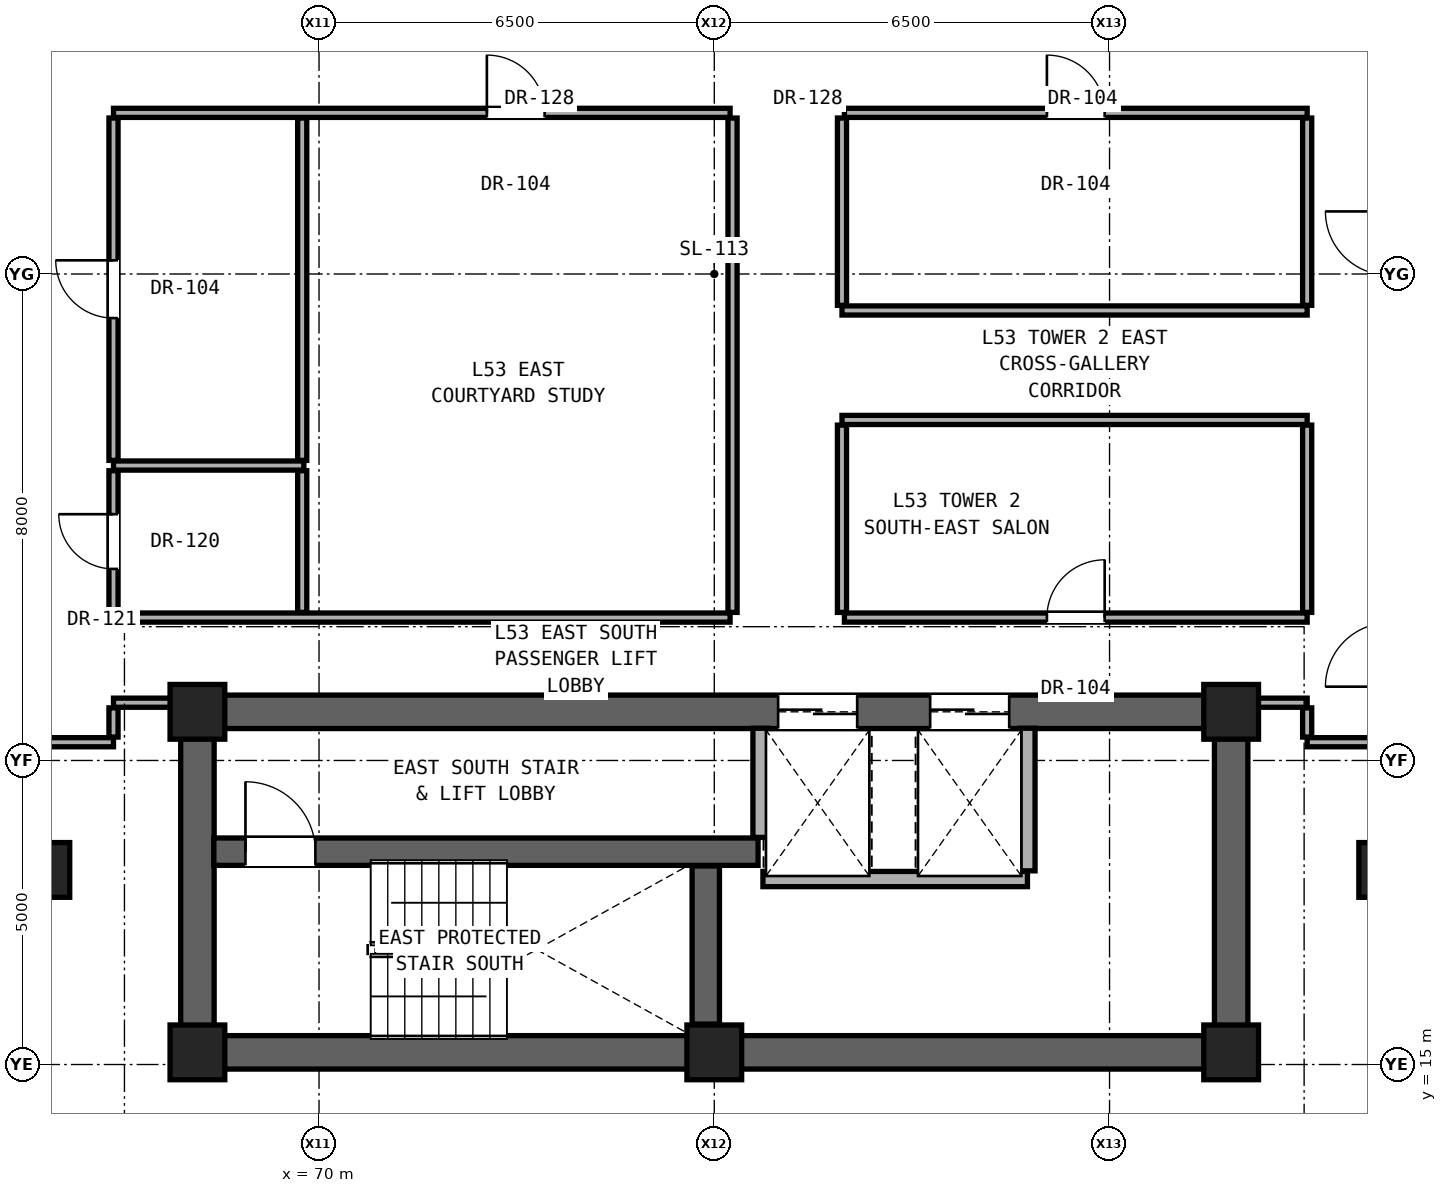
"""IFC4 building model, lengths in metres.
Left out: names, types, materials, properties, quantities, classifications, styles, units other than length and angle.
Written with IfcOpenShell. Run it as: python <this file> out.ifc"""

import sys

from ifc_helpers import new_model, si_unit, direction, frame, frame_2d, origin, origin_2d, place, context, subcontext, project, spatial, rectangle, extrude, element, fill, save


model = new_model("IFC4")
c1 = context("Model", 3, precision=1e-05, world=origin(), true_north=direction((0.0, 1.0)))
c2 = subcontext(c1, "Body", "Model", "MODEL_VIEW")
j1 = project(units=[si_unit("LENGTHUNIT", "METRE"), si_unit("PLANEANGLEUNIT", "RADIAN")], contexts=[c1])
p1 = place(None, origin())
s1 = spatial("IfcSite", under=j1, at=p1, CompositionType="ELEMENT")
p2 = place(p1, origin())
s2 = spatial("IfcBuilding", under=s1, at=p2, CompositionType="ELEMENT")
p3 = place(p2, frame((0.0, 0.0, 186.9)))
s3 = spatial("IfcBuildingStorey", under=s2, at=p3, CompositionType="ELEMENT", Elevation=186.9)
for number, where, z_axis, x_axis in (
    (1, (68.0, 15.2, 0.0), (0.0, 0.0, 1.0), (1.0, 0.0, 0.0)),
    (2, (76.5, 15.2, 0.0), (0.0, 0.0, 1.0), (1.0, 0.0, 0.0)),
    (3, (85.0, 15.2, 0.0), (0.0, 0.0, 1.0), (1.0, 0.0, 0.0)),
    (4, (68.0, 20.8, 0.0), (0.0, 0.0, 1.0), (1.0, 0.0, 0.0)),
    (5, (85.0, 20.8, 0.0), (0.0, 0.0, 1.0), (1.0, 0.0, 0.0)),
):
    element("IfcColumn", number, at=place(p3, frame(where, z_axis=z_axis, x_axis=x_axis)), inside=s3, PredefinedType="COLUMN", context=c2, shape_type="SweptSolid", body=[
        extrude(rectangle(XDim=0.9, YDim=0.9, at=origin_2d()), origin(), (0.0, 0.0, 1.0), 3.25),
    ])
for number, where, z_axis, x_axis in (
    (6, (65.6, 18.2, 0.0), (0.0, 0.0, 1.0), (1.0, 0.0, 0.0)),
    (7, (87.4, 18.2, 0.0), (0.0, 0.0, 1.0), (1.0, 0.0, 0.0)),
):
    element("IfcColumn", number, at=place(p3, frame(where, z_axis=z_axis, x_axis=x_axis)), inside=s3, PredefinedType="PILASTER", context=c2, shape_type="SweptSolid", body=[
        extrude(rectangle(XDim=0.6, YDim=0.9, at=origin_2d()), origin(), (0.0, 0.0, 1.0), 3.25),
    ])
p4 = place(p3, frame((68.0, 15.2, 0.0), z_axis=(0.0, 0.0, 1.0), x_axis=(1.0, 0.0, 0.0)))
e8 = element("IfcWall", 8, at=p4, inside=s3, PredefinedType="SHEAR", context=c2, shape_type="SweptSolid", body=[
    extrude(rectangle(XDim=17.0, YDim=0.55, at=frame_2d((8.5, 0.0))), origin(), (0.0, 0.0, 1.0), 3.05),
])
for number, where, z_axis, x_axis in (
    (9, (68.0, 15.2, 0.0), (0.0, 0.0, 1.0), (0.0, 1.0, 0.0)),
    (10, (85.0, 15.2, 0.0), (0.0, 0.0, 1.0), (0.0, 1.0, 0.0)),
):
    element("IfcWall", number, at=place(p3, frame(where, z_axis=z_axis, x_axis=x_axis)), inside=s3, PredefinedType="SHEAR", context=c2, shape_type="SweptSolid", body=[
        extrude(rectangle(XDim=5.6, YDim=0.55, at=frame_2d((2.8, 0.0))), origin(), (0.0, 0.0, 1.0), 3.05),
    ])
p5 = place(p3, frame((68.0, 20.8, 0.0), z_axis=(0.0, 0.0, 1.0), x_axis=(1.0, 0.0, 0.0)))
e11 = element("IfcWall", 11, at=p5, inside=s3, PredefinedType="SHEAR", context=c2, shape_type="SweptSolid", body=[
    extrude(rectangle(XDim=17.0, YDim=0.55, at=frame_2d((8.5, 0.0))), origin(), (0.0, 0.0, 1.0), 3.05),
])
p6 = place(p5, frame((9.55, 0.0, 0.0)))
e12 = element("IfcOpeningElement", 12, at=p6, cuts=e11, PredefinedType="OPENING", context=c2, shape_type="SweptSolid", body=[
    extrude(rectangle(XDim=1.3, YDim=2.3, at=frame_2d((0.65, 1.15))), frame((0.0, 0.285, 0.0), z_axis=(0.0, -1.0, 0.0), x_axis=(1.0, 0.0, 0.0)), (0.0, 0.0, 1.0), 0.57),
])
p7 = place(p5, frame((12.05, 0.0, 0.0)))
e13 = element("IfcOpeningElement", 13, at=p7, cuts=e11, PredefinedType="OPENING", context=c2, shape_type="SweptSolid", body=[
    extrude(rectangle(XDim=1.3, YDim=2.3, at=frame_2d((0.65, 1.15))), frame((0.0, 0.285, 0.0), z_axis=(0.0, -1.0, 0.0), x_axis=(1.0, 0.0, 0.0)), (0.0, 0.0, 1.0), 0.57),
])
p8 = place(p3, frame((77.3, 18.05, 0.0), z_axis=(0.0, 0.0, 1.0), x_axis=(1.0, 0.0, 0.0)))
e14 = element("IfcWall", 14, at=p8, inside=s3, PredefinedType="SOLIDWALL", context=c2, shape_type="SweptSolid", body=[
    extrude(rectangle(XDim=4.35, YDim=0.25, at=frame_2d((2.175, 0.0))), origin(), (0.0, 0.0, 1.0), 3.05),
])
p9 = place(p3, frame((68.27, 18.5, 0.0), z_axis=(0.0, 0.0, 1.0), x_axis=(1.0, 0.0, 0.0)))
e15 = element("IfcWall", 15, at=p9, inside=s3, PredefinedType="SHEAR", context=c2, shape_type="SweptSolid", body=[
    extrude(rectangle(XDim=8.95, YDim=0.45, at=frame_2d((4.475, 0.0))), origin(), (0.0, 0.0, 1.0), 3.05),
])
p10 = place(p9, frame((0.52, 0.0, 0.0)))
e16 = element("IfcOpeningElement", 16, at=p10, cuts=e15, PredefinedType="OPENING", context=c2, shape_type="SweptSolid", body=[
    extrude(rectangle(XDim=1.15, YDim=2.2, at=frame_2d((0.575, 1.1))), frame((0.0, 0.235, 0.0), z_axis=(0.0, -1.0, 0.0), x_axis=(1.0, 0.0, 0.0)), (0.0, 0.0, 1.0), 0.47),
])
p11 = place(p3, frame((65.25, 20.3, 0.0), z_axis=(0.0, 0.0, 1.0), x_axis=(1.0, 0.0, 0.0)))
e17 = element("IfcWall", 17, at=p11, inside=s3, PredefinedType="PARTITIONING", context=c2, shape_type="SweptSolid", body=[
    extrude(rectangle(XDim=1.37, YDim=0.15, at=frame_2d((0.685, 0.0))), origin(), (0.0, 0.0, 1.0), 3.05),
])
p12 = place(p3, frame((86.25, 20.3, 0.0), z_axis=(0.0, 0.0, 1.0), x_axis=(1.0, 0.0, 0.0)))
e18 = element("IfcWall", 18, at=p12, inside=s3, PredefinedType="PARTITIONING", context=c2, shape_type="SweptSolid", body=[
    extrude(rectangle(XDim=1.35, YDim=0.15, at=frame_2d((0.675, 0.0))), origin(), (0.0, 0.0, 1.0), 3.05),
])
p13 = place(p3, frame((66.62, 20.95, 0.0), z_axis=(0.0, 0.0, 1.0), x_axis=(1.0, 0.0, 0.0)))
e19 = element("IfcWall", 19, at=p13, inside=s3, PredefinedType="PARTITIONING", context=c2, shape_type="SweptSolid", body=[
    extrude(rectangle(XDim=1.11, YDim=0.15, at=frame_2d((0.555, 0.0))), origin(), (0.0, 0.0, 1.0), 2.442),
])
p14 = place(p3, frame((85.27, 20.95, 0.0), z_axis=(0.0, 0.0, 1.0), x_axis=(1.0, 0.0, 0.0)))
e20 = element("IfcWall", 20, at=p14, inside=s3, PredefinedType="PARTITIONING", context=c2, shape_type="SweptSolid", body=[
    extrude(rectangle(XDim=0.98, YDim=0.15, at=frame_2d((0.49, 0.0))), origin(), (0.0, 0.0, 1.0), 2.442),
])
p15 = place(p3, frame((66.62, 22.35, 0.0), z_axis=(0.0, 0.0, 1.0), x_axis=(1.0, 0.0, 0.0)))
e21 = element("IfcWall", 21, at=p15, inside=s3, PredefinedType="PARTITIONING", context=c2, shape_type="SweptSolid", body=[
    extrude(rectangle(XDim=10.14, YDim=0.15, at=frame_2d((5.07, 0.0))), origin(), (0.0, 0.0, 1.0), 2.186),
])
p16 = place(p3, frame((78.64, 22.35, 0.0), z_axis=(0.0, 0.0, 1.0), x_axis=(1.0, 0.0, 0.0)))
e22 = element("IfcWall", 22, at=p16, inside=s3, PredefinedType="PARTITIONING", context=c2, shape_type="SweptSolid", body=[
    extrude(rectangle(XDim=7.61, YDim=0.15, at=frame_2d((3.805, 0.0))), origin(), (0.0, 0.0, 1.0), 2.186),
])
p17 = place(p16, frame((3.33, 0.0, 0.0)))
e23 = element("IfcOpeningElement", 23, at=p17, cuts=e22, PredefinedType="OPENING", context=c2, shape_type="SweptSolid", body=[
    extrude(rectangle(XDim=0.95, YDim=2.15, at=frame_2d((0.475, 1.075))), frame((0.0, 0.085, 0.0), z_axis=(0.0, -1.0, 0.0), x_axis=(1.0, 0.0, 0.0)), (0.0, 0.0, 1.0), 0.17),
])
p18 = place(p3, frame((66.62, 24.85, 0.0), z_axis=(0.0, 0.0, 1.0), x_axis=(1.0, 0.0, 0.0)))
e24 = element("IfcWall", 24, at=p18, inside=s3, PredefinedType="PARTITIONING", context=c2, shape_type="SweptSolid", body=[
    extrude(rectangle(XDim=3.13, YDim=0.15, at=frame_2d((1.565, 0.0))), origin(), (0.0, 0.0, 1.0), 2.186),
])
for number, where, z_axis, x_axis in (
    (25, (78.6, 25.6, 0.0), (0.0, 0.0, 1.0), (1.0, 0.0, 0.0)),
    (26, (78.6, 27.4, 0.0), (0.0, 0.0, 1.0), (1.0, 0.0, 0.0)),
):
    element("IfcWall", number, at=place(p3, frame(where, z_axis=z_axis, x_axis=x_axis)), inside=s3, PredefinedType="PARTITIONING", context=c2, shape_type="SweptSolid", body=[
        extrude(rectangle(XDim=7.65, YDim=0.15, at=frame_2d((3.825, 0.0))), origin(), (0.0, 0.0, 1.0), 2.186),
    ])
p19 = place(p3, frame((66.62, 30.65, 0.0), z_axis=(0.0, 0.0, 1.0), x_axis=(1.0, 0.0, 0.0)))
e27 = element("IfcWall", 27, at=p19, inside=s3, PredefinedType="PARTITIONING", context=c2, shape_type="SweptSolid", body=[
    extrude(rectangle(XDim=10.14, YDim=0.15, at=frame_2d((5.07, 0.0))), origin(), (0.0, 0.0, 1.0), 2.186),
])
p20 = place(p19, frame((6.14, 0.0, 0.0)))
e28 = element("IfcOpeningElement", 28, at=p20, cuts=e27, PredefinedType="OPENING", context=c2, shape_type="SweptSolid", body=[
    extrude(rectangle(XDim=0.95, YDim=2.15, at=frame_2d((0.475, 1.075))), frame((0.0, 0.085, 0.0), z_axis=(0.0, -1.0, 0.0), x_axis=(1.0, 0.0, 0.0)), (0.0, 0.0, 1.0), 0.17),
])
p21 = place(p3, frame((78.64, 30.65, 0.0), z_axis=(0.0, 0.0, 1.0), x_axis=(1.0, 0.0, 0.0)))
e29 = element("IfcWall", 29, at=p21, inside=s3, PredefinedType="PARTITIONING", context=c2, shape_type="SweptSolid", body=[
    extrude(rectangle(XDim=7.61, YDim=0.15, at=frame_2d((3.805, 0.0))), origin(), (0.0, 0.0, 1.0), 2.186),
])
p22 = place(p21, frame((3.33, 0.0, 0.0)))
e30 = element("IfcOpeningElement", 30, at=p22, cuts=e29, PredefinedType="OPENING", context=c2, shape_type="SweptSolid", body=[
    extrude(rectangle(XDim=0.95, YDim=2.15, at=frame_2d((0.475, 1.075))), frame((0.0, 0.085, 0.0), z_axis=(0.0, -1.0, 0.0), x_axis=(1.0, 0.0, 0.0)), (0.0, 0.0, 1.0), 0.17),
])
p23 = place(p3, frame((66.62, 20.385, 0.0), z_axis=(0.0, 0.0, 1.0), x_axis=(0.0, 1.0, 0.0)))
e31 = element("IfcWall", 31, at=p23, inside=s3, PredefinedType="PARTITIONING", context=c2, shape_type="SweptSolid", body=[
    extrude(rectangle(XDim=0.48, YDim=0.15, at=frame_2d((0.24, 0.0))), origin(), (0.0, 0.0, 1.0), 2.442),
])
p24 = place(p3, frame((66.62, 22.435, 0.0), z_axis=(0.0, 0.0, 1.0), x_axis=(0.0, 1.0, 0.0)))
e32 = element("IfcWall", 32, at=p24, inside=s3, PredefinedType="PARTITIONING", context=c2, shape_type="SweptSolid", body=[
    extrude(rectangle(XDim=2.33, YDim=0.15, at=frame_2d((1.165, 0.0))), origin(), (0.0, 0.0, 1.0), 3.05),
])
p25 = place(p24, frame((0.715, 0.0, 0.0)))
e33 = element("IfcOpeningElement", 33, at=p25, cuts=e32, PredefinedType="OPENING", context=c2, shape_type="SweptSolid", body=[
    extrude(rectangle(XDim=0.9, YDim=2.1, at=frame_2d((0.45, 1.05))), frame((0.0, 0.085, 0.0), z_axis=(0.0, -1.0, 0.0), x_axis=(1.0, 0.0, 0.0)), (0.0, 0.0, 1.0), 0.17),
])
p26 = place(p3, frame((66.62, 24.935, 0.0), z_axis=(0.0, 0.0, 1.0), x_axis=(0.0, 1.0, 0.0)))
e34 = element("IfcWall", 34, at=p26, inside=s3, PredefinedType="PARTITIONING", context=c2, shape_type="SweptSolid", body=[
    extrude(rectangle(XDim=5.63, YDim=0.15, at=frame_2d((2.815, 0.0))), origin(), (0.0, 0.0, 1.0), 2.346),
])
p27 = place(p26, frame((2.34, 0.0, 0.0)))
e35 = element("IfcOpeningElement", 35, at=p27, cuts=e34, PredefinedType="OPENING", context=c2, shape_type="SweptSolid", body=[
    extrude(rectangle(XDim=0.95, YDim=2.15, at=frame_2d((0.475, 1.075))), frame((0.0, 0.085, 0.0), z_axis=(0.0, -1.0, 0.0), x_axis=(1.0, 0.0, 0.0)), (0.0, 0.0, 1.0), 0.17),
])
p28 = place(p3, frame((69.723, 22.435, 0.0), z_axis=(0.0, 0.0, 1.0), x_axis=(0.0, 1.0, 0.0)))
e36 = element("IfcWall", 36, at=p28, inside=s3, PredefinedType="PARTITIONING", context=c2, shape_type="SweptSolid", body=[
    extrude(rectangle(XDim=2.33, YDim=0.15, at=frame_2d((1.165, 0.0))), origin(), (0.0, 0.0, 1.0), 3.05),
])
p29 = place(p3, frame((69.723, 24.935, 0.0), z_axis=(0.0, 0.0, 1.0), x_axis=(0.0, 1.0, 0.0)))
e37 = element("IfcWall", 37, at=p29, inside=s3, PredefinedType="PARTITIONING", context=c2, shape_type="SweptSolid", body=[
    extrude(rectangle(XDim=5.63, YDim=0.15, at=frame_2d((2.815, 0.0))), origin(), (0.0, 0.0, 1.0), 2.186),
])
p30 = place(p3, frame((76.36, 15.665, 0.0), z_axis=(0.0, 0.0, 1.0), x_axis=(0.0, 1.0, 0.0)))
e38 = element("IfcWall", 38, at=p30, inside=s3, PredefinedType="SHEAR", context=c2, shape_type="SweptSolid", body=[
    extrude(rectangle(XDim=2.6, YDim=0.45, at=frame_2d((1.3, 0.0))), origin(), (0.0, 0.0, 1.0), 3.05),
])
p31 = place(p3, frame((76.8, 22.435, 0.0), z_axis=(0.0, 0.0, 1.0), x_axis=(0.0, 1.0, 0.0)))
e39 = element("IfcWall", 39, at=p31, inside=s3, PredefinedType="PARTITIONING", context=c2, shape_type="SweptSolid", body=[
    extrude(rectangle(XDim=8.13, YDim=0.15, at=frame_2d((4.065, 0.0))), origin(), (0.0, 0.0, 1.0), 2.186),
])
p32 = place(p3, frame((77.26, 18.735, 0.0), z_axis=(0.0, 0.0, 1.0), x_axis=(0.0, 1.0, 0.0)))
e40 = element("IfcWall", 40, at=p32, inside=s3, PredefinedType="SOLIDWALL", context=c2, shape_type="SweptSolid", body=[
    extrude(rectangle(XDim=1.795, YDim=0.25, at=frame_2d((0.897, 0.0))), origin(), (0.0, 0.0, 1.0), 3.05),
])
p33 = place(p3, frame((78.6, 22.435, 0.0), z_axis=(0.0, 0.0, 1.0), x_axis=(0.0, 1.0, 0.0)))
e41 = element("IfcWall", 41, at=p33, inside=s3, PredefinedType="PARTITIONING", context=c2, shape_type="SweptSolid", body=[
    extrude(rectangle(XDim=3.08, YDim=0.15, at=frame_2d((1.54, 0.0))), origin(), (0.0, 0.0, 1.0), 3.05),
])
p34 = place(p3, frame((78.6, 27.485, 0.0), z_axis=(0.0, 0.0, 1.0), x_axis=(0.0, 1.0, 0.0)))
e42 = element("IfcWall", 42, at=p34, inside=s3, PredefinedType="PARTITIONING", context=c2, shape_type="SweptSolid", body=[
    extrude(rectangle(XDim=3.08, YDim=0.15, at=frame_2d((1.54, 0.0))), origin(), (0.0, 0.0, 1.0), 2.186),
])
p35 = place(p3, frame((81.65, 18.185, 0.0), z_axis=(0.0, 0.0, 1.0), x_axis=(0.0, 1.0, 0.0)))
e43 = element("IfcWall", 43, at=p35, inside=s3, PredefinedType="SOLIDWALL", context=c2, shape_type="SweptSolid", body=[
    extrude(rectangle(XDim=2.345, YDim=0.25, at=frame_2d((1.172, 0.0))), origin(), (0.0, 0.0, 1.0), 3.05),
])
p36 = place(p3, frame((86.25, 20.385, 0.0), z_axis=(0.0, 0.0, 1.0), x_axis=(0.0, 1.0, 0.0)))
e44 = element("IfcWall", 44, at=p36, inside=s3, PredefinedType="PARTITIONING", context=c2, shape_type="SweptSolid", body=[
    extrude(rectangle(XDim=0.48, YDim=0.15, at=frame_2d((0.24, 0.0))), origin(), (0.0, 0.0, 1.0), 2.442),
])
p37 = place(p3, frame((86.25, 22.435, 0.0), z_axis=(0.0, 0.0, 1.0), x_axis=(0.0, 1.0, 0.0)))
e45 = element("IfcWall", 45, at=p37, inside=s3, PredefinedType="PARTITIONING", context=c2, shape_type="SweptSolid", body=[
    extrude(rectangle(XDim=3.08, YDim=0.15, at=frame_2d((1.54, 0.0))), origin(), (0.0, 0.0, 1.0), 3.05),
])
p38 = place(p3, frame((86.25, 27.485, 0.0), z_axis=(0.0, 0.0, 1.0), x_axis=(0.0, 1.0, 0.0)))
e46 = element("IfcWall", 46, at=p38, inside=s3, PredefinedType="PARTITIONING", context=c2, shape_type="SweptSolid", body=[
    extrude(rectangle(XDim=3.08, YDim=0.15, at=frame_2d((1.54, 0.0))), origin(), (0.0, 0.0, 1.0), 2.346),
])
p39 = place(p10, origin())
e47 = element("IfcDoor", 47, at=p39, inside=s3, OperationType="SINGLE_SWING_LEFT", PredefinedType="DOOR", context=c2, shape_type="SweptSolid", body=[
    extrude(rectangle(XDim=1.15, YDim=2.2, at=frame_2d((0.575, 1.1))), frame((0.0, 0.025, 0.0), z_axis=(0.0, -1.0, 0.0), x_axis=(1.0, 0.0, 0.0)), (0.0, 0.0, 1.0), 0.05),
])
fill(e16, e47)
p40 = place(p25, origin())
e48 = element("IfcDoor", 48, at=p40, inside=s3, OperationType="SINGLE_SWING_RIGHT", PredefinedType="DOOR", context=c2, shape_type="SweptSolid", body=[
    extrude(rectangle(XDim=0.9, YDim=2.1, at=frame_2d((0.45, 1.05))), frame((0.0, 0.025, 0.0), z_axis=(0.0, -1.0, 0.0), x_axis=(1.0, 0.0, 0.0)), (0.0, 0.0, 1.0), 0.05),
])
fill(e33, e48)
p41 = place(p27, origin())
e49 = element("IfcDoor", 49, at=p41, inside=s3, OperationType="SINGLE_SWING_RIGHT", PredefinedType="DOOR", context=c2, shape_type="SweptSolid", body=[
    extrude(rectangle(XDim=0.95, YDim=2.15, at=frame_2d((0.475, 1.075))), frame((0.0, 0.025, 0.0), z_axis=(0.0, -1.0, 0.0), x_axis=(1.0, 0.0, 0.0)), (0.0, 0.0, 1.0), 0.05),
])
fill(e35, e49)
p42 = place(p20, origin())
e50 = element("IfcDoor", 50, at=p42, inside=s3, OperationType="SINGLE_SWING_LEFT", PredefinedType="DOOR", context=c2, shape_type="SweptSolid", body=[
    extrude(rectangle(XDim=0.95, YDim=2.15, at=frame_2d((0.475, 1.075))), frame((0.0, 0.025, 0.0), z_axis=(0.0, -1.0, 0.0), x_axis=(1.0, 0.0, 0.0)), (0.0, 0.0, 1.0), 0.05),
])
fill(e28, e50)
p43 = place(p17, origin())
e51 = element("IfcDoor", 51, at=p43, inside=s3, OperationType="SINGLE_SWING_RIGHT", PredefinedType="DOOR", context=c2, shape_type="SweptSolid", body=[
    extrude(rectangle(XDim=0.95, YDim=2.15, at=frame_2d((0.475, 1.075))), frame((0.0, 0.025, 0.0), z_axis=(0.0, -1.0, 0.0), x_axis=(1.0, 0.0, 0.0)), (0.0, 0.0, 1.0), 0.05),
])
fill(e23, e51)
p44 = place(p22, origin())
e52 = element("IfcDoor", 52, at=p44, inside=s3, OperationType="SINGLE_SWING_LEFT", PredefinedType="DOOR", context=c2, shape_type="SweptSolid", body=[
    extrude(rectangle(XDim=0.95, YDim=2.15, at=frame_2d((0.475, 1.075))), frame((0.0, 0.025, 0.0), z_axis=(0.0, -1.0, 0.0), x_axis=(1.0, 0.0, 0.0)), (0.0, 0.0, 1.0), 0.05),
])
fill(e30, e52)
p45 = place(p6, origin())
e53 = element("IfcDoor", 53, at=p45, inside=s3, OperationType="DOUBLE_DOOR_SLIDING", PredefinedType="DOOR", context=c2, shape_type="SweptSolid", body=[
    extrude(rectangle(XDim=1.3, YDim=2.3, at=frame_2d((0.65, 1.15))), frame((0.0, 0.025, 0.0), z_axis=(0.0, -1.0, 0.0), x_axis=(1.0, 0.0, 0.0)), (0.0, 0.0, 1.0), 0.05),
])
fill(e12, e53)
p46 = place(p7, origin())
e54 = element("IfcDoor", 54, at=p46, inside=s3, OperationType="DOUBLE_DOOR_SLIDING", PredefinedType="DOOR", context=c2, shape_type="SweptSolid", body=[
    extrude(rectangle(XDim=1.3, YDim=2.3, at=frame_2d((0.65, 1.15))), frame((0.0, 0.025, 0.0), z_axis=(0.0, -1.0, 0.0), x_axis=(1.0, 0.0, 0.0)), (0.0, 0.0, 1.0), 0.05),
])
fill(e13, e54)
save(model, sys.argv[1])
